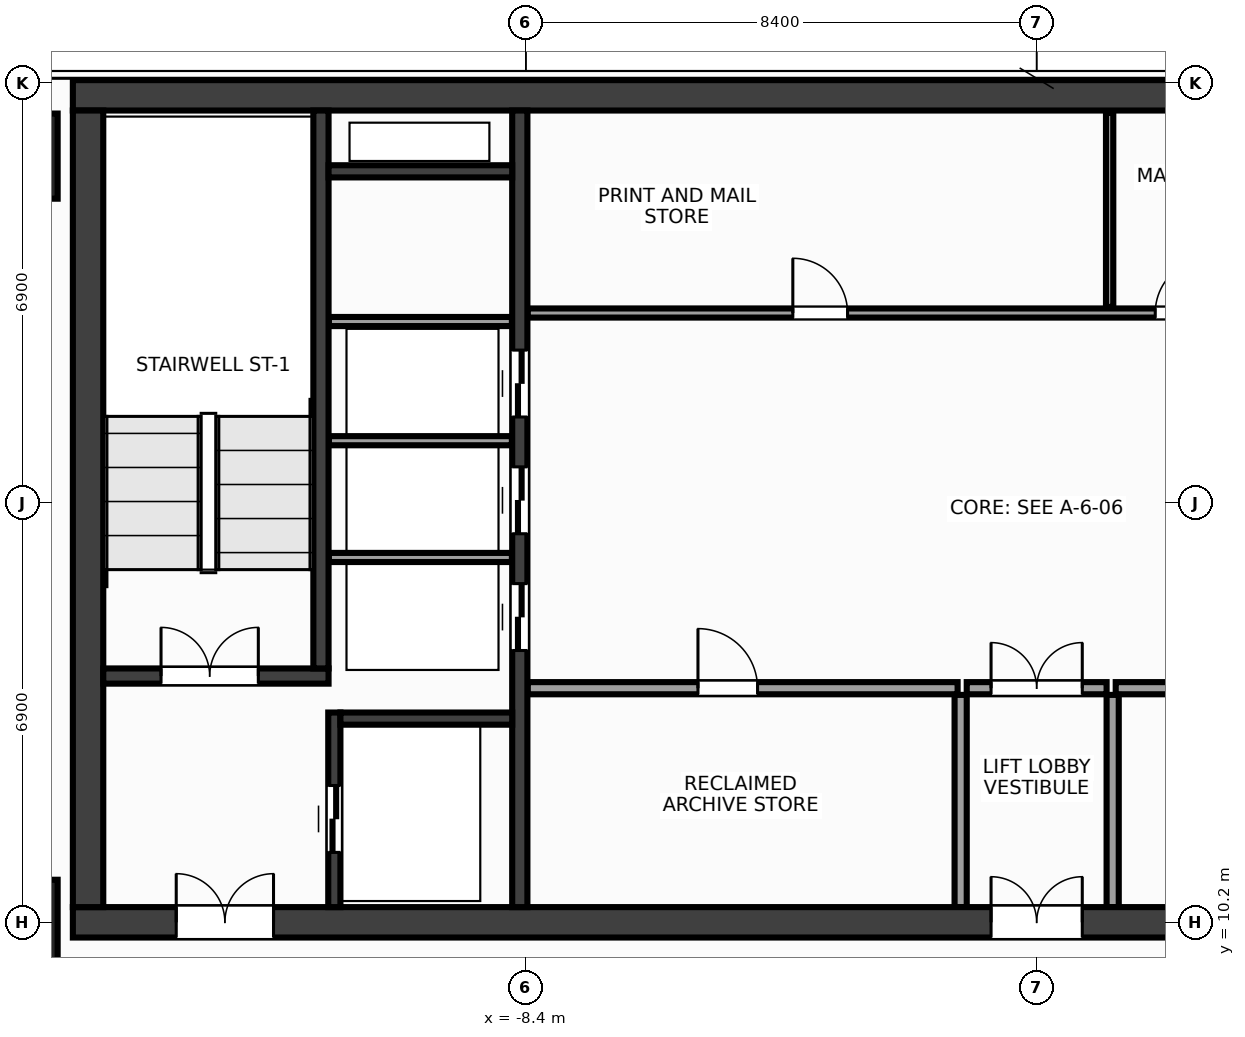
"""IFC4 building model, lengths in metres.
Left out: names, types, materials, properties, quantities, classifications, styles, units other than length and angle.
Written with IfcOpenShell. Run it as: python <this file> out.ifc"""

import sys

from ifc_helpers import new_model, si_unit, direction, frame, frame_2d, origin, origin_2d, place, context, subcontext, project, spatial, rectangle, extrude, source, transform, mapped, element, fill, save


model = new_model("IFC4")
c1 = context("Model", 3, precision=1e-05, world=origin(), true_north=direction((0.0, 1.0)))
c2 = subcontext(c1, "Body", "Model", "MODEL_VIEW")
j1 = project(units=[si_unit("LENGTHUNIT", "METRE"), si_unit("PLANEANGLEUNIT", "RADIAN")], contexts=[c1])
p1 = place(None, origin())
s1 = spatial("IfcSite", under=j1, at=p1, CompositionType="ELEMENT")
p2 = place(p1, origin())
s2 = spatial("IfcBuilding", under=s1, at=p2, CompositionType="ELEMENT")
p3 = place(p2, frame((0.0, 0.0, 246.8)))
s3 = spatial("IfcBuildingStorey", under=s2, at=p3, CompositionType="ELEMENT", Elevation=246.8)
m1 = source(origin(), c2, "Body", "SweptSolid", [
    extrude(rectangle(XDim=31.7, YDim=0.5, at=frame_2d((15.85, 0.0))), origin(), (0.0, 0.0, 1.0), 3.6),
])
p4 = place(p3, frame((-15.85, 23.8, 0.0), z_axis=(0.0, 0.0, 1.0), x_axis=(1.0, 0.0, 0.0)))
e1 = element("IfcWall", 1, at=p4, inside=s3, PredefinedType="SHEAR", context=c2, shape_type="MappedRepresentation", body=[
    mapped(m1, transform((0.0, 0.0, 0.0), x_axis=(1.0, 0.0, 0.0), y_axis=(0.0, 1.0, 0.0), z_axis=(0.0, 0.0, 1.0), scale=1.0)),
])
p5 = place(p3, frame((-15.85, 10.2, 0.0), z_axis=(0.0, 0.0, 1.0), x_axis=(1.0, 0.0, 0.0)))
e2 = element("IfcWall", 2, at=p5, inside=s3, PredefinedType="SHEAR", context=c2, shape_type="MappedRepresentation", body=[
    mapped(m1, transform((0.0, 0.0, 0.0), x_axis=(1.0, 0.0, 0.0), y_axis=(0.0, 1.0, 0.0), z_axis=(0.0, 0.0, 1.0), scale=1.0)),
])
p6 = place(p5, frame((1.7, 0.0, 0.0)))
e3 = element("IfcOpeningElement", 3, at=p6, cuts=e2, PredefinedType="OPENING", context=c2, shape_type="SweptSolid", body=[
    extrude(rectangle(XDim=1.6, YDim=2.15, at=frame_2d((0.8, 1.075))), frame((0.0, 0.262, 0.0), z_axis=(0.0, -1.0, 0.0), x_axis=(1.0, 0.0, 0.0)), (0.0, 0.0, 1.0), 0.524),
])
p7 = place(p5, frame((28.4, 0.0, 0.0)))
e4 = element("IfcOpeningElement", 4, at=p7, cuts=e2, PredefinedType="OPENING", context=c2, shape_type="SweptSolid", body=[
    extrude(rectangle(XDim=1.6, YDim=2.15, at=frame_2d((0.8, 1.075))), frame((0.0, 0.262, 0.0), z_axis=(0.0, -1.0, 0.0), x_axis=(1.0, 0.0, 0.0)), (0.0, 0.0, 1.0), 0.524),
])
p8 = place(p5, frame((15.1, 0.0, 0.0)))
e5 = element("IfcOpeningElement", 5, at=p8, cuts=e2, PredefinedType="OPENING", context=c2, shape_type="SweptSolid", body=[
    extrude(rectangle(XDim=1.5, YDim=2.2, at=frame_2d((0.75, 1.1))), frame((0.0, 0.262, 0.0), z_axis=(0.0, -1.0, 0.0), x_axis=(1.0, 0.0, 0.0)), (0.0, 0.0, 1.0), 0.524),
])
m2 = source(origin(), c2, "Body", "SweptSolid", [
    extrude(rectangle(XDim=13.1, YDim=0.5, at=frame_2d((6.55, 0.0))), origin(), (0.0, 0.0, 1.0), 3.6),
])
p9 = place(p3, frame((-15.6, 10.45, 0.0), z_axis=(0.0, 0.0, 1.0), x_axis=(0.0, 1.0, 0.0)))
e6 = element("IfcWall", 6, at=p9, inside=s3, PredefinedType="SHEAR", context=c2, shape_type="MappedRepresentation", body=[
    mapped(m2, transform((0.0, 0.0, 0.0), x_axis=(1.0, 0.0, 0.0), y_axis=(0.0, 1.0, 0.0), z_axis=(0.0, 0.0, 1.0), scale=1.0)),
])
m3 = source(origin(), c2, "Body", "SweptSolid", [
    extrude(rectangle(XDim=13.1, YDim=0.25, at=frame_2d((6.55, 0.0))), origin(), (0.0, 0.0, 1.0), 3.6),
])
p10 = place(p3, frame((-8.5, 10.45, 0.0), z_axis=(0.0, 0.0, 1.0), x_axis=(0.0, 1.0, 0.0)))
e7 = element("IfcWall", 7, at=p10, inside=s3, PredefinedType="SHEAR", context=c2, shape_type="MappedRepresentation", body=[
    mapped(m3, transform((0.0, 0.0, 0.0), x_axis=(1.0, 0.0, 0.0), y_axis=(0.0, 1.0, 0.0), z_axis=(0.0, 0.0, 1.0), scale=1.0)),
])
p11 = place(p10, frame((4.22, 0.0, 0.0)))
e8 = element("IfcOpeningElement", 8, at=p11, cuts=e7, PredefinedType="OPENING", context=c2, shape_type="SweptSolid", body=[
    extrude(rectangle(XDim=1.1, YDim=2.15, at=frame_2d((0.55, 1.075))), frame((0.0, 0.137, 0.0), z_axis=(0.0, -1.0, 0.0), x_axis=(1.0, 0.0, 0.0)), (0.0, 0.0, 1.0), 0.274),
])
p12 = place(p10, frame((6.14, 0.0, 0.0)))
e9 = element("IfcOpeningElement", 9, at=p12, cuts=e7, PredefinedType="OPENING", context=c2, shape_type="SweptSolid", body=[
    extrude(rectangle(XDim=1.1, YDim=2.15, at=frame_2d((0.55, 1.075))), frame((0.0, 0.137, 0.0), z_axis=(0.0, -1.0, 0.0), x_axis=(1.0, 0.0, 0.0)), (0.0, 0.0, 1.0), 0.274),
])
p13 = place(p10, frame((8.06, 0.0, 0.0)))
e10 = element("IfcOpeningElement", 10, at=p13, cuts=e7, PredefinedType="OPENING", context=c2, shape_type="SweptSolid", body=[
    extrude(rectangle(XDim=1.1, YDim=2.15, at=frame_2d((0.55, 1.075))), frame((0.0, 0.137, 0.0), z_axis=(0.0, -1.0, 0.0), x_axis=(1.0, 0.0, 0.0)), (0.0, 0.0, 1.0), 0.274),
])
m4 = source(origin(), c2, "Body", "SweptSolid", [
    extrude(rectangle(XDim=3.705, YDim=0.25, at=frame_2d((1.853, 0.0))), origin(), (0.0, 0.0, 1.0), 3.6),
])
p14 = place(p3, frame((-15.35, 14.25, 0.0), z_axis=(0.0, 0.0, 1.0), x_axis=(1.0, 0.0, 0.0)))
e11 = element("IfcWall", 11, at=p14, inside=s3, PredefinedType="SHEAR", context=c2, shape_type="MappedRepresentation", body=[
    mapped(m4, transform((0.0, 0.0, 0.0), x_axis=(1.0, 0.0, 0.0), y_axis=(0.0, 1.0, 0.0), z_axis=(0.0, 0.0, 1.0), scale=1.0)),
])
p15 = place(p14, frame((0.95, 0.0, 0.0)))
e12 = element("IfcOpeningElement", 12, at=p15, cuts=e11, PredefinedType="OPENING", context=c2, shape_type="SweptSolid", body=[
    extrude(rectangle(XDim=1.6, YDim=2.15, at=frame_2d((0.8, 1.075))), frame((0.0, 0.137, 0.0), z_axis=(0.0, -1.0, 0.0), x_axis=(1.0, 0.0, 0.0)), (0.0, 0.0, 1.0), 0.274),
])
m5 = source(origin(), c2, "Body", "SweptSolid", [
    extrude(rectangle(XDim=9.175, YDim=0.25, at=frame_2d((4.587, 0.0))), origin(), (0.0, 0.0, 1.0), 3.6),
])
p16 = place(p3, frame((-11.77, 14.375, 0.0), z_axis=(0.0, 0.0, 1.0), x_axis=(0.0, 1.0, 0.0)))
e13 = element("IfcWall", 13, at=p16, inside=s3, PredefinedType="SHEAR", context=c2, shape_type="MappedRepresentation", body=[
    mapped(m5, transform((0.0, 0.0, 0.0), x_axis=(1.0, 0.0, 0.0), y_axis=(0.0, 1.0, 0.0), z_axis=(0.0, 0.0, 1.0), scale=1.0)),
])
m6 = source(origin(), c2, "Body", "SweptSolid", [
    extrude(rectangle(XDim=3.2, YDim=0.2, at=frame_2d((1.6, 0.0))), origin(), (0.0, 0.0, 1.0), 3.6),
])
p17 = place(p3, frame((-11.55, 10.45, 0.0), z_axis=(0.0, 0.0, 1.0), x_axis=(0.0, 1.0, 0.0)))
e14 = element("IfcWall", 14, at=p17, inside=s3, PredefinedType="SHEAR", context=c2, shape_type="MappedRepresentation", body=[
    mapped(m6, transform((0.0, 0.0, 0.0), x_axis=(1.0, 0.0, 0.0), y_axis=(0.0, 1.0, 0.0), z_axis=(0.0, 0.0, 1.0), scale=1.0)),
])
p18 = place(p17, frame((0.9, 0.0, 0.0)))
e15 = element("IfcOpeningElement", 15, at=p18, cuts=e14, PredefinedType="OPENING", context=c2, shape_type="SweptSolid", body=[
    extrude(rectangle(XDim=1.1, YDim=2.15, at=frame_2d((0.55, 1.075))), frame((0.0, 0.112, 0.0), z_axis=(0.0, -1.0, 0.0), x_axis=(1.0, 0.0, 0.0)), (0.0, 0.0, 1.0), 0.224),
])
m7 = source(origin(), c2, "Body", "SweptSolid", [
    extrude(rectangle(XDim=2.825, YDim=0.2, at=frame_2d((1.413, 0.0))), origin(), (0.0, 0.0, 1.0), 3.6),
])
p19 = place(p3, frame((-11.45, 13.55, 0.0), z_axis=(0.0, 0.0, 1.0), x_axis=(1.0, 0.0, 0.0)))
e16 = element("IfcWall", 16, at=p19, inside=s3, PredefinedType="SHEAR", context=c2, shape_type="MappedRepresentation", body=[
    mapped(m7, transform((0.0, 0.0, 0.0), x_axis=(1.0, 0.0, 0.0), y_axis=(0.0, 1.0, 0.0), z_axis=(0.0, 0.0, 1.0), scale=1.0)),
])
m8 = source(origin(), c2, "Body", "SweptSolid", [
    extrude(rectangle(XDim=3.02, YDim=0.2, at=frame_2d((1.51, 0.0))), origin(), (0.0, 0.0, 1.0), 3.6),
])
p20 = place(p3, frame((-11.645, 22.55, 0.0), z_axis=(0.0, 0.0, 1.0), x_axis=(1.0, 0.0, 0.0)))
e17 = element("IfcWall", 17, at=p20, inside=s3, PredefinedType="SHEAR", context=c2, shape_type="MappedRepresentation", body=[
    mapped(m8, transform((0.0, 0.0, 0.0), x_axis=(1.0, 0.0, 0.0), y_axis=(0.0, 1.0, 0.0), z_axis=(0.0, 0.0, 1.0), scale=1.0)),
])
m9 = source(origin(), c2, "Body", "SweptSolid", [
    extrude(rectangle(XDim=1.4, YDim=1.4, at=origin_2d()), origin(), (0.0, 0.0, 1.0), 3.6),
])
for number, where, z_axis, x_axis in (
    (18, (-16.8, 10.2, 0.0), (0.0, 0.0, 1.0), (1.0, 0.0, 0.0)),
    (19, (-16.8, 22.8, 0.0), (0.0, 0.0, 1.0), (1.0, 0.0, 0.0)),
):
    element("IfcColumn", number, at=place(p3, frame(where, z_axis=z_axis, x_axis=x_axis)), inside=s3, PredefinedType="COLUMN", context=c2, shape_type="MappedRepresentation", body=[
        mapped(m9, transform((0.0, 0.0, 0.0), x_axis=(1.0, 0.0, 0.0), y_axis=(0.0, 1.0, 0.0), z_axis=(0.0, 0.0, 1.0), scale=1.0)),
    ])
m10 = source(origin(), c2, "Body", "SweptSolid", [
    extrude(rectangle(XDim=3.01, YDim=0.15, at=frame_2d((1.505, 0.0))), origin(), (0.0, 0.0, 1.0), 3.37),
])
for number, where, z_axis, x_axis in (
    (20, (-11.64, 16.2, 0.0), (0.0, 0.0, 1.0), (1.0, 0.0, 0.0)),
    (21, (-11.64, 18.12, 0.0), (0.0, 0.0, 1.0), (1.0, 0.0, 0.0)),
    (22, (-11.64, 20.08, 0.0), (0.0, 0.0, 1.0), (1.0, 0.0, 0.0)),
):
    element("IfcWall", number, at=place(p3, frame(where, z_axis=z_axis, x_axis=x_axis)), inside=s3, PredefinedType="PARTITIONING", context=c2, shape_type="MappedRepresentation", body=[
        mapped(m10, transform((0.0, 0.0, 0.0), x_axis=(1.0, 0.0, 0.0), y_axis=(0.0, 1.0, 0.0), z_axis=(0.0, 0.0, 1.0), scale=1.0)),
    ])
m11 = source(origin(), c2, "Body", "SweptSolid", [
    extrude(rectangle(XDim=7.07, YDim=0.2, at=frame_2d((3.535, 0.0))), origin(), (0.0, 0.0, 1.0), 3.37),
])
p21 = place(p3, frame((-8.37, 14.05, 0.0), z_axis=(0.0, 0.0, 1.0), x_axis=(1.0, 0.0, 0.0)))
e23 = element("IfcWall", 23, at=p21, inside=s3, PredefinedType="PARTITIONING", context=c2, shape_type="MappedRepresentation", body=[
    mapped(m11, transform((0.0, 0.0, 0.0), x_axis=(1.0, 0.0, 0.0), y_axis=(0.0, 1.0, 0.0), z_axis=(0.0, 0.0, 1.0), scale=1.0)),
])
p22 = place(p21, frame((2.8, 0.0, 0.0)))
e24 = element("IfcOpeningElement", 24, at=p22, cuts=e23, PredefinedType="OPENING", context=c2, shape_type="SweptSolid", body=[
    extrude(rectangle(XDim=0.98, YDim=2.15, at=frame_2d((0.49, 1.075))), frame((0.0, 0.112, 0.0), z_axis=(0.0, -1.0, 0.0), x_axis=(1.0, 0.0, 0.0)), (0.0, 0.0, 1.0), 0.224),
])
p23 = place(p3, frame((1.3, 14.05, 0.0), z_axis=(0.0, 0.0, 1.0), x_axis=(1.0, 0.0, 0.0)))
e25 = element("IfcWall", 25, at=p23, inside=s3, PredefinedType="PARTITIONING", context=c2, shape_type="MappedRepresentation", body=[
    mapped(m11, transform((0.0, 0.0, 0.0), x_axis=(1.0, 0.0, 0.0), y_axis=(0.0, 1.0, 0.0), z_axis=(0.0, 0.0, 1.0), scale=1.0)),
])
p24 = place(p23, frame((1.16, 0.0, 0.0)))
e26 = element("IfcOpeningElement", 26, at=p24, cuts=e25, PredefinedType="OPENING", context=c2, shape_type="SweptSolid", body=[
    extrude(rectangle(XDim=0.9, YDim=2.15, at=frame_2d((0.45, 1.075))), frame((0.0, 0.112, 0.0), z_axis=(0.0, -1.0, 0.0), x_axis=(1.0, 0.0, 0.0)), (0.0, 0.0, 1.0), 0.224),
])
p25 = place(p23, frame((4.61, 0.0, 0.0)))
e27 = element("IfcOpeningElement", 27, at=p25, cuts=e25, PredefinedType="OPENING", context=c2, shape_type="SweptSolid", body=[
    extrude(rectangle(XDim=0.9, YDim=2.15, at=frame_2d((0.45, 1.075))), frame((0.0, 0.112, 0.0), z_axis=(0.0, -1.0, 0.0), x_axis=(1.0, 0.0, 0.0)), (0.0, 0.0, 1.0), 0.224),
])
m12 = source(origin(), c2, "Body", "SweptSolid", [
    extrude(rectangle(XDim=3.49, YDim=0.2, at=frame_2d((1.745, 0.0))), origin(), (0.0, 0.0, 1.0), 3.37),
])
for number, where, z_axis, x_axis in (
    (28, (-1.25, 10.45, 0.0), (0.0, 0.0, 1.0), (0.0, 1.0, 0.0)),
    (29, (1.25, 10.45, 0.0), (0.0, 0.0, 1.0), (0.0, 1.0, 0.0)),
):
    element("IfcWall", number, at=place(p3, frame(where, z_axis=z_axis, x_axis=x_axis)), inside=s3, PredefinedType="PARTITIONING", context=c2, shape_type="MappedRepresentation", body=[
        mapped(m12, transform((0.0, 0.0, 0.0), x_axis=(1.0, 0.0, 0.0), y_axis=(0.0, 1.0, 0.0), z_axis=(0.0, 0.0, 1.0), scale=1.0)),
    ])
m13 = source(origin(), c2, "Body", "SweptSolid", [
    extrude(rectangle(XDim=2.3, YDim=0.2, at=frame_2d((1.15, 0.0))), origin(), (0.0, 0.0, 1.0), 3.37),
])
p26 = place(p3, frame((-1.15, 14.05, 0.0), z_axis=(0.0, 0.0, 1.0), x_axis=(1.0, 0.0, 0.0)))
e30 = element("IfcWall", 30, at=p26, inside=s3, PredefinedType="PARTITIONING", context=c2, shape_type="MappedRepresentation", body=[
    mapped(m13, transform((0.0, 0.0, 0.0), x_axis=(1.0, 0.0, 0.0), y_axis=(0.0, 1.0, 0.0), z_axis=(0.0, 0.0, 1.0), scale=1.0)),
])
p27 = place(p26, frame((0.4, 0.0, 0.0)))
e31 = element("IfcOpeningElement", 31, at=p27, cuts=e30, PredefinedType="OPENING", context=c2, shape_type="SweptSolid", body=[
    extrude(rectangle(XDim=1.5, YDim=2.2, at=frame_2d((0.75, 1.1))), frame((0.0, 0.112, 0.0), z_axis=(0.0, -1.0, 0.0), x_axis=(1.0, 0.0, 0.0)), (0.0, 0.0, 1.0), 0.224),
])
m14 = source(origin(), c2, "Body", "SweptSolid", [
    extrude(rectangle(XDim=14.59, YDim=0.15, at=frame_2d((7.295, 0.0))), origin(), (0.0, 0.0, 1.0), 3.37),
])
p28 = place(p3, frame((-8.37, 20.22, 0.0), z_axis=(0.0, 0.0, 1.0), x_axis=(1.0, 0.0, 0.0)))
e32 = element("IfcWall", 32, at=p28, inside=s3, PredefinedType="PARTITIONING", context=c2, shape_type="MappedRepresentation", body=[
    mapped(m14, transform((0.0, 0.0, 0.0), x_axis=(1.0, 0.0, 0.0), y_axis=(0.0, 1.0, 0.0), z_axis=(0.0, 0.0, 1.0), scale=1.0)),
])
p29 = place(p28, frame((4.36, 0.0, 0.0)))
e33 = element("IfcOpeningElement", 33, at=p29, cuts=e32, PredefinedType="OPENING", context=c2, shape_type="SweptSolid", body=[
    extrude(rectangle(XDim=0.9, YDim=2.15, at=frame_2d((0.45, 1.075))), frame((0.0, 0.087, 0.0), z_axis=(0.0, -1.0, 0.0), x_axis=(1.0, 0.0, 0.0)), (0.0, 0.0, 1.0), 0.174),
])
p30 = place(p28, frame((10.32, 0.0, 0.0)))
e34 = element("IfcOpeningElement", 34, at=p30, cuts=e32, PredefinedType="OPENING", context=c2, shape_type="SweptSolid", body=[
    extrude(rectangle(XDim=0.9, YDim=2.15, at=frame_2d((0.45, 1.075))), frame((0.0, 0.087, 0.0), z_axis=(0.0, -1.0, 0.0), x_axis=(1.0, 0.0, 0.0)), (0.0, 0.0, 1.0), 0.174),
])
p31 = place(p28, frame((12.77, 0.0, 0.0)))
e35 = element("IfcOpeningElement", 35, at=p31, cuts=e32, PredefinedType="OPENING", context=c2, shape_type="SweptSolid", body=[
    extrude(rectangle(XDim=0.9, YDim=2.15, at=frame_2d((0.45, 1.075))), frame((0.0, 0.087, 0.0), z_axis=(0.0, -1.0, 0.0), x_axis=(1.0, 0.0, 0.0)), (0.0, 0.0, 1.0), 0.174),
])
m15 = source(origin(), c2, "Body", "SweptSolid", [
    extrude(rectangle(XDim=3.19, YDim=0.12, at=frame_2d((1.595, 0.0))), origin(), (0.0, 0.0, 1.0), 3.37),
])
p32 = place(p3, frame((1.2, 20.32, 0.0), z_axis=(0.0, 0.0, 1.0), x_axis=(0.0, 1.0, 0.0)))
e36 = element("IfcWall", 36, at=p32, inside=s3, PredefinedType="PARTITIONING", context=c2, shape_type="MappedRepresentation", body=[
    mapped(m15, transform((0.0, 0.0, 0.0), x_axis=(1.0, 0.0, 0.0), y_axis=(0.0, 1.0, 0.0), z_axis=(0.0, 0.0, 1.0), scale=1.0)),
])
m16 = source(origin(), c2, "Body", "SweptSolid", [
    extrude(rectangle(XDim=1.6, YDim=2.15, at=frame_2d((0.8, 1.075))), frame((0.0, 0.025, 0.0), z_axis=(0.0, -1.0, 0.0), x_axis=(1.0, 0.0, 0.0)), (0.0, 0.0, 1.0), 0.05),
])
p33 = place(p15, origin())
e37 = element("IfcDoor", 37, at=p33, inside=s3, OperationType="DOUBLE_DOOR_SINGLE_SWING", PredefinedType="DOOR", context=c2, shape_type="MappedRepresentation", body=[
    mapped(m16, transform((0.0, 0.0, 0.0), x_axis=(1.0, 0.0, 0.0), y_axis=(0.0, 1.0, 0.0), z_axis=(0.0, 0.0, 1.0), scale=1.0)),
])
fill(e12, e37)
p34 = place(p6, origin())
e38 = element("IfcDoor", 38, at=p34, inside=s3, OperationType="DOUBLE_DOOR_SINGLE_SWING", PredefinedType="DOOR", context=c2, shape_type="MappedRepresentation", body=[
    mapped(m16, transform((0.0, 0.0, 0.0), x_axis=(1.0, 0.0, 0.0), y_axis=(0.0, 1.0, 0.0), z_axis=(0.0, 0.0, 1.0), scale=1.0)),
])
fill(e3, e38)
m17 = source(origin(), c2, "Body", "SweptSolid", [
    extrude(rectangle(XDim=1.1, YDim=2.15, at=frame_2d((0.55, 1.075))), frame((0.0, 0.025, 0.0), z_axis=(0.0, -1.0, 0.0), x_axis=(1.0, 0.0, 0.0)), (0.0, 0.0, 1.0), 0.05),
])
p35 = place(p18, origin())
e39 = element("IfcDoor", 39, at=p35, inside=s3, OperationType="DOUBLE_DOOR_SLIDING", PredefinedType="DOOR", context=c2, shape_type="MappedRepresentation", body=[
    mapped(m17, transform((0.0, 0.0, 0.0), x_axis=(1.0, 0.0, 0.0), y_axis=(0.0, 1.0, 0.0), z_axis=(0.0, 0.0, 1.0), scale=1.0)),
])
fill(e15, e39)
p36 = place(p11, origin())
e40 = element("IfcDoor", 40, at=p36, inside=s3, OperationType="DOUBLE_DOOR_SLIDING", PredefinedType="DOOR", context=c2, shape_type="MappedRepresentation", body=[
    mapped(m17, transform((0.0, 0.0, 0.0), x_axis=(1.0, 0.0, 0.0), y_axis=(0.0, 1.0, 0.0), z_axis=(0.0, 0.0, 1.0), scale=1.0)),
])
fill(e8, e40)
p37 = place(p12, origin())
e41 = element("IfcDoor", 41, at=p37, inside=s3, OperationType="DOUBLE_DOOR_SLIDING", PredefinedType="DOOR", context=c2, shape_type="MappedRepresentation", body=[
    mapped(m17, transform((0.0, 0.0, 0.0), x_axis=(1.0, 0.0, 0.0), y_axis=(0.0, 1.0, 0.0), z_axis=(0.0, 0.0, 1.0), scale=1.0)),
])
fill(e9, e41)
p38 = place(p13, origin())
e42 = element("IfcDoor", 42, at=p38, inside=s3, OperationType="DOUBLE_DOOR_SLIDING", PredefinedType="DOOR", context=c2, shape_type="MappedRepresentation", body=[
    mapped(m17, transform((0.0, 0.0, 0.0), x_axis=(1.0, 0.0, 0.0), y_axis=(0.0, 1.0, 0.0), z_axis=(0.0, 0.0, 1.0), scale=1.0)),
])
fill(e10, e42)
m18 = source(origin(), c2, "Body", "SweptSolid", [
    extrude(rectangle(XDim=0.98, YDim=2.15, at=frame_2d((0.49, 1.075))), frame((0.0, 0.025, 0.0), z_axis=(0.0, -1.0, 0.0), x_axis=(1.0, 0.0, 0.0)), (0.0, 0.0, 1.0), 0.05),
])
p39 = place(p22, origin())
e43 = element("IfcDoor", 43, at=p39, inside=s3, OperationType="SINGLE_SWING_LEFT", PredefinedType="DOOR", context=c2, shape_type="MappedRepresentation", body=[
    mapped(m18, transform((0.0, 0.0, 0.0), x_axis=(1.0, 0.0, 0.0), y_axis=(0.0, 1.0, 0.0), z_axis=(0.0, 0.0, 1.0), scale=1.0)),
])
fill(e24, e43)
m19 = source(origin(), c2, "Body", "SweptSolid", [
    extrude(rectangle(XDim=1.5, YDim=2.2, at=frame_2d((0.75, 1.1))), frame((0.0, 0.025, 0.0), z_axis=(0.0, -1.0, 0.0), x_axis=(1.0, 0.0, 0.0)), (0.0, 0.0, 1.0), 0.05),
])
p40 = place(p27, origin())
e44 = element("IfcDoor", 44, at=p40, inside=s3, OperationType="DOUBLE_DOOR_SINGLE_SWING", PredefinedType="DOOR", context=c2, shape_type="MappedRepresentation", body=[
    mapped(m19, transform((0.0, 0.0, 0.0), x_axis=(1.0, 0.0, 0.0), y_axis=(0.0, 1.0, 0.0), z_axis=(0.0, 0.0, 1.0), scale=1.0)),
])
fill(e31, e44)
p41 = place(p8, origin())
e45 = element("IfcDoor", 45, at=p41, inside=s3, OperationType="DOUBLE_DOOR_SINGLE_SWING", PredefinedType="DOOR", context=c2, shape_type="MappedRepresentation", body=[
    mapped(m19, transform((0.0, 0.0, 0.0), x_axis=(1.0, 0.0, 0.0), y_axis=(0.0, 1.0, 0.0), z_axis=(0.0, 0.0, 1.0), scale=1.0)),
])
fill(e5, e45)
m20 = source(origin(), c2, "Body", "SweptSolid", [
    extrude(rectangle(XDim=0.9, YDim=2.15, at=frame_2d((0.45, 1.075))), frame((0.0, 0.025, 0.0), z_axis=(0.0, -1.0, 0.0), x_axis=(1.0, 0.0, 0.0)), (0.0, 0.0, 1.0), 0.05),
])
p42 = place(p29, origin())
e46 = element("IfcDoor", 46, at=p42, inside=s3, OperationType="SINGLE_SWING_LEFT", PredefinedType="DOOR", context=c2, shape_type="MappedRepresentation", body=[
    mapped(m20, transform((0.0, 0.0, 0.0), x_axis=(1.0, 0.0, 0.0), y_axis=(0.0, 1.0, 0.0), z_axis=(0.0, 0.0, 1.0), scale=1.0)),
])
fill(e33, e46)
p43 = place(p30, origin())
e47 = element("IfcDoor", 47, at=p43, inside=s3, OperationType="SINGLE_SWING_RIGHT", PredefinedType="DOOR", context=c2, shape_type="MappedRepresentation", body=[
    mapped(m20, transform((0.0, 0.0, 0.0), x_axis=(1.0, 0.0, 0.0), y_axis=(0.0, 1.0, 0.0), z_axis=(0.0, 0.0, 1.0), scale=1.0)),
])
fill(e34, e47)
save(model, sys.argv[1])
